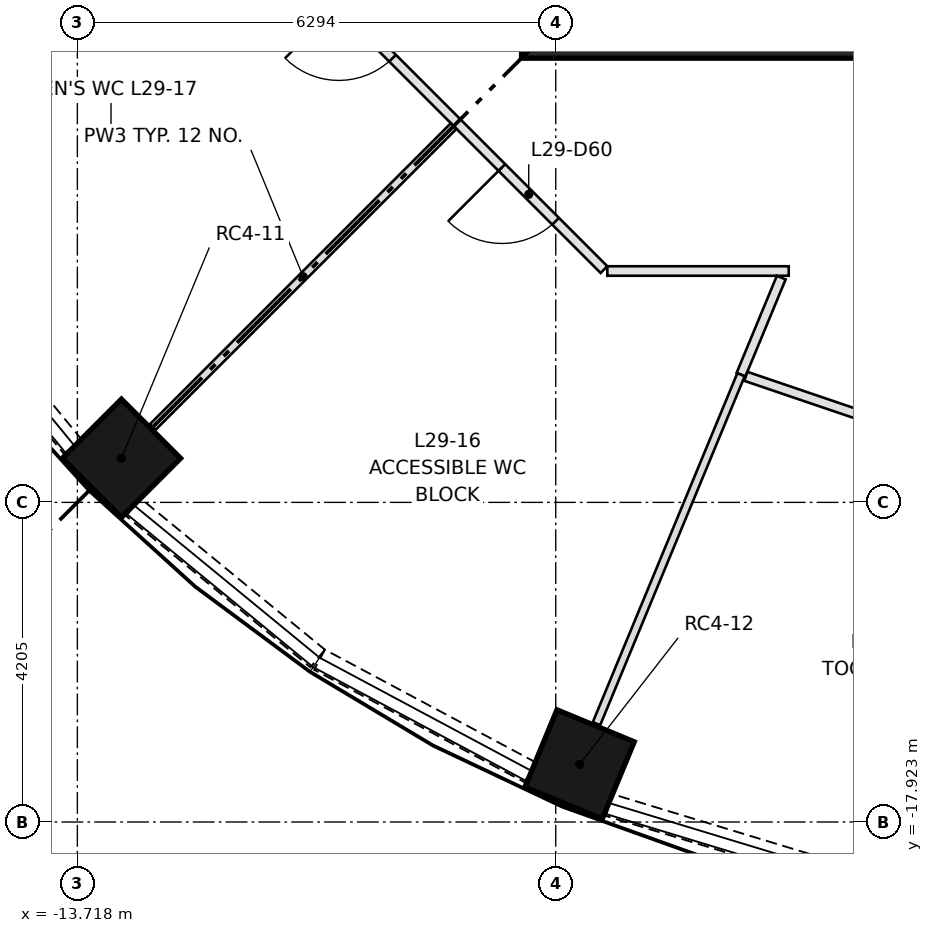
"""IFC4 building model, lengths in metres.
Left out: names, types, materials, properties, quantities, classifications, styles, units other than length and angle.
Written with IfcOpenShell. Run it as: python <this file> out.ifc"""

import sys

from ifc_helpers import new_model, si_unit, direction, frame, frame_2d, origin, origin_2d, place, context, subcontext, project, spatial, rectangle, extrude, element, fill, save


model = new_model("IFC4")
c1 = context("Model", 3, precision=1e-05, world=origin(), true_north=direction((0.0, 1.0)))
c2 = subcontext(c1, "Body", "Model", "MODEL_VIEW")
j1 = project(units=[si_unit("LENGTHUNIT", "METRE"), si_unit("PLANEANGLEUNIT", "RADIAN")], contexts=[c1])
p1 = place(None, origin())
s1 = spatial("IfcSite", under=j1, at=p1, CompositionType="ELEMENT")
p2 = place(p1, origin())
s2 = spatial("IfcBuilding", under=s1, at=p2, CompositionType="ELEMENT")
p3 = place(p2, frame((0.0, 0.0, 112.9)))
s3 = spatial("IfcBuildingStorey", under=s2, at=p3, CompositionType="ELEMENT", Elevation=112.9)
for number, where, z_axis, x_axis in (
    (1, (-13.138, -13.138, 0.0), (0.0, 0.0, 1.0), (-0.707, -0.707, 0.0)),
    (2, (-7.11, -17.166, 0.0), (0.0, 0.0, 1.0), (-0.383, -0.924, 0.0)),
):
    element("IfcColumn", number, at=place(p3, frame(where, z_axis=z_axis, x_axis=x_axis)), inside=s3, PredefinedType="COLUMN", context=c2, shape_type="SweptSolid", body=[
        extrude(rectangle(XDim=1.1, YDim=1.1, at=origin_2d()), origin(), (0.0, 0.0, 1.0), 3.65),
    ])
p4 = place(p3, frame((-7.874, -7.499, 0.0), z_axis=(0.0, 0.0, 1.0), x_axis=(1.0, 0.0, 0.0)))
e3 = element("IfcWall", 3, at=p4, inside=s3, PredefinedType="SHEAR", context=c2, shape_type="SweptSolid", body=[
    extrude(rectangle(XDim=15.748, YDim=0.75, at=frame_2d((7.874, 0.0))), origin(), (0.0, 0.0, 1.0), 3.65),
])
for number, where, z_axis, x_axis in (
    (4, (-15.771, -10.557, 0.0), (0.0, 0.0, 1.0), (0.634, -0.773, 0.0)),
    (5, (-12.983, -13.781, 0.0), (0.0, 0.0, 1.0), (0.773, -0.634, 0.0)),
):
    element("IfcWall", number, at=place(p3, frame(where, z_axis=z_axis, x_axis=x_axis)), inside=s3, PredefinedType="SOLIDWALL", context=c2, shape_type="SweptSolid", body=[
        extrude(rectangle(XDim=3.139, YDim=0.3, at=frame_2d((1.569, 0.0))), origin(), (0.0, 0.0, 1.0), 0.9),
    ])
p5 = place(p3, frame((-10.532, -15.788, 0.0), z_axis=(0.0, 0.0, 1.0), x_axis=(0.88193278355, -0.471375185282, 0.0)))
e6 = element("IfcWall", 6, at=p5, inside=s3, PredefinedType="SOLIDWALL", context=c2, shape_type="SweptSolid", body=[
    extrude(rectangle(XDim=3.139, YDim=0.3, at=frame_2d((1.57, 0.0))), origin(), (0.0, 0.0, 1.0), 0.9),
])
p6 = place(p3, frame((-6.722, -17.699, 0.0), z_axis=(0.0, 0.0, 1.0), x_axis=(0.956961595403, -0.290214584271, 0.0)))
e7 = element("IfcWall", 7, at=p6, inside=s3, PredefinedType="SOLIDWALL", context=c2, shape_type="SweptSolid", body=[
    extrude(rectangle(XDim=3.139, YDim=0.3, at=frame_2d((1.57, 0.0))), origin(), (0.0, 0.0, 1.0), 0.9),
])
p7 = place(p3, frame((-8.722, -8.722, 0.0), z_axis=(0.0, 0.0, 1.0), x_axis=(-0.707151428813, 0.707062130741, 0.0)))
e8 = element("IfcWall", 8, at=p7, inside=s3, PredefinedType="PARTITIONING", context=c2, shape_type="SweptSolid", body=[
    extrude(rectangle(XDim=2.734, YDim=0.125, at=frame_2d((1.367, 0.0))), origin(), (0.0, 0.0, 1.0), 3.3),
])
p8 = place(p7, frame((1.2, 0.0, 0.0)))
e9 = element("IfcOpeningElement", 9, at=p8, cuts=e8, PredefinedType="OPENING", context=c2, shape_type="SweptSolid", body=[
    extrude(rectangle(XDim=1.0, YDim=2.1, at=frame_2d((0.5, 1.05))), frame((0.0, 0.073, 0.0), z_axis=(0.0, -1.0, 0.0), x_axis=(1.0, 0.0, 0.0)), (0.0, 0.0, 1.0), 0.145),
])
p9 = place(p3, frame((-6.789, -10.656, 0.0), z_axis=(0.0, 0.0, 1.0), x_axis=(-0.707062130741, 0.707151428813, 0.0)))
e10 = element("IfcWall", 10, at=p9, inside=s3, PredefinedType="PARTITIONING", context=c2, shape_type="SweptSolid", body=[
    extrude(rectangle(XDim=2.734, YDim=0.125, at=frame_2d((1.367, 0.0))), origin(), (0.0, 0.0, 1.0), 3.3),
])
p10 = place(p9, frame((0.9, 0.0, 0.0)))
e11 = element("IfcOpeningElement", 11, at=p10, cuts=e10, PredefinedType="OPENING", context=c2, shape_type="SweptSolid", body=[
    extrude(rectangle(XDim=1.0, YDim=2.1, at=frame_2d((0.5, 1.05))), frame((0.0, 0.073, 0.0), z_axis=(0.0, -1.0, 0.0), x_axis=(1.0, 0.0, 0.0)), (0.0, 0.0, 1.0), 0.145),
])
p11 = place(p3, frame((-4.359, -10.674, 0.0), z_axis=(0.0, 0.0, 1.0), x_axis=(-1.0, 0.0, 0.0)))
e12 = element("IfcWall", 12, at=p11, inside=s3, PredefinedType="PARTITIONING", context=c2, shape_type="SweptSolid", body=[
    extrude(rectangle(XDim=2.386, YDim=0.125, at=frame_2d((1.193, 0.0))), origin(), (0.0, 0.0, 1.0), 3.3),
])
p12 = place(p3, frame((-12.728, -12.728, 0.0), z_axis=(0.0, 0.0, 1.0), x_axis=(0.707106781187, 0.707106781187, 0.0)))
e13 = element("IfcWall", 13, at=p12, inside=s3, PredefinedType="PARTITIONING", context=c2, shape_type="SweptSolid", body=[
    extrude(rectangle(XDim=5.602, YDim=0.105, at=frame_2d((2.801, 0.0))), origin(), (0.0, 0.0, 1.0), 3.3),
])
p13 = place(p3, frame((-4.457, -10.76, 0.0), z_axis=(0.0, 0.0, 1.0), x_axis=(-0.382746785562, -0.923853288213, 0.0)))
e14 = element("IfcWall", 14, at=p13, inside=s3, PredefinedType="PARTITIONING", context=c2, shape_type="SweptSolid", body=[
    extrude(rectangle(XDim=1.383, YDim=0.125, at=frame_2d((0.691, 0.0))), origin(), (0.0, 0.0, 1.0), 3.3),
])
p14 = place(p3, frame((-4.986, -12.038, 0.0), z_axis=(0.0, 0.0, 1.0), x_axis=(-0.38266126553, -0.923888714003, 0.0)))
e15 = element("IfcWall", 15, at=p14, inside=s3, PredefinedType="PARTITIONING", context=c2, shape_type="SweptSolid", body=[
    extrude(rectangle(XDim=4.97, YDim=0.105, at=frame_2d((2.485, 0.0))), origin(), (0.0, 0.0, 1.0), 3.3),
])
p15 = place(p3, frame((-3.376, -12.585, 0.0), z_axis=(0.0, 0.0, 1.0), x_axis=(-0.946920220616, 0.321468654442, 0.0)))
e16 = element("IfcWall", 16, at=p15, inside=s3, PredefinedType="PARTITIONING", context=c2, shape_type="SweptSolid", body=[
    extrude(rectangle(XDim=1.634, YDim=0.125, at=frame_2d((0.817, 0.0))), origin(), (0.0, 0.0, 1.0), 3.3),
])
p16 = place(p8, origin())
e17 = element("IfcDoor", 17, at=p16, inside=s3, OperationType="SINGLE_SWING_RIGHT", PredefinedType="DOOR", context=c2, shape_type="SweptSolid", body=[
    extrude(rectangle(XDim=1.0, YDim=2.1, at=frame_2d((0.5, 1.05))), frame((0.0, 0.025, 0.0), z_axis=(0.0, -1.0, 0.0), x_axis=(1.0, 0.0, 0.0)), (0.0, 0.0, 1.0), 0.05),
])
fill(e9, e17)
p17 = place(p10, origin())
e18 = element("IfcDoor", 18, at=p17, inside=s3, OperationType="SINGLE_SWING_RIGHT", PredefinedType="DOOR", context=c2, shape_type="SweptSolid", body=[
    extrude(rectangle(XDim=1.0, YDim=2.1, at=frame_2d((0.5, 1.05))), frame((0.0, 0.025, 0.0), z_axis=(0.0, -1.0, 0.0), x_axis=(1.0, 0.0, 0.0)), (0.0, 0.0, 1.0), 0.05),
])
fill(e11, e18)
save(model, sys.argv[1])
